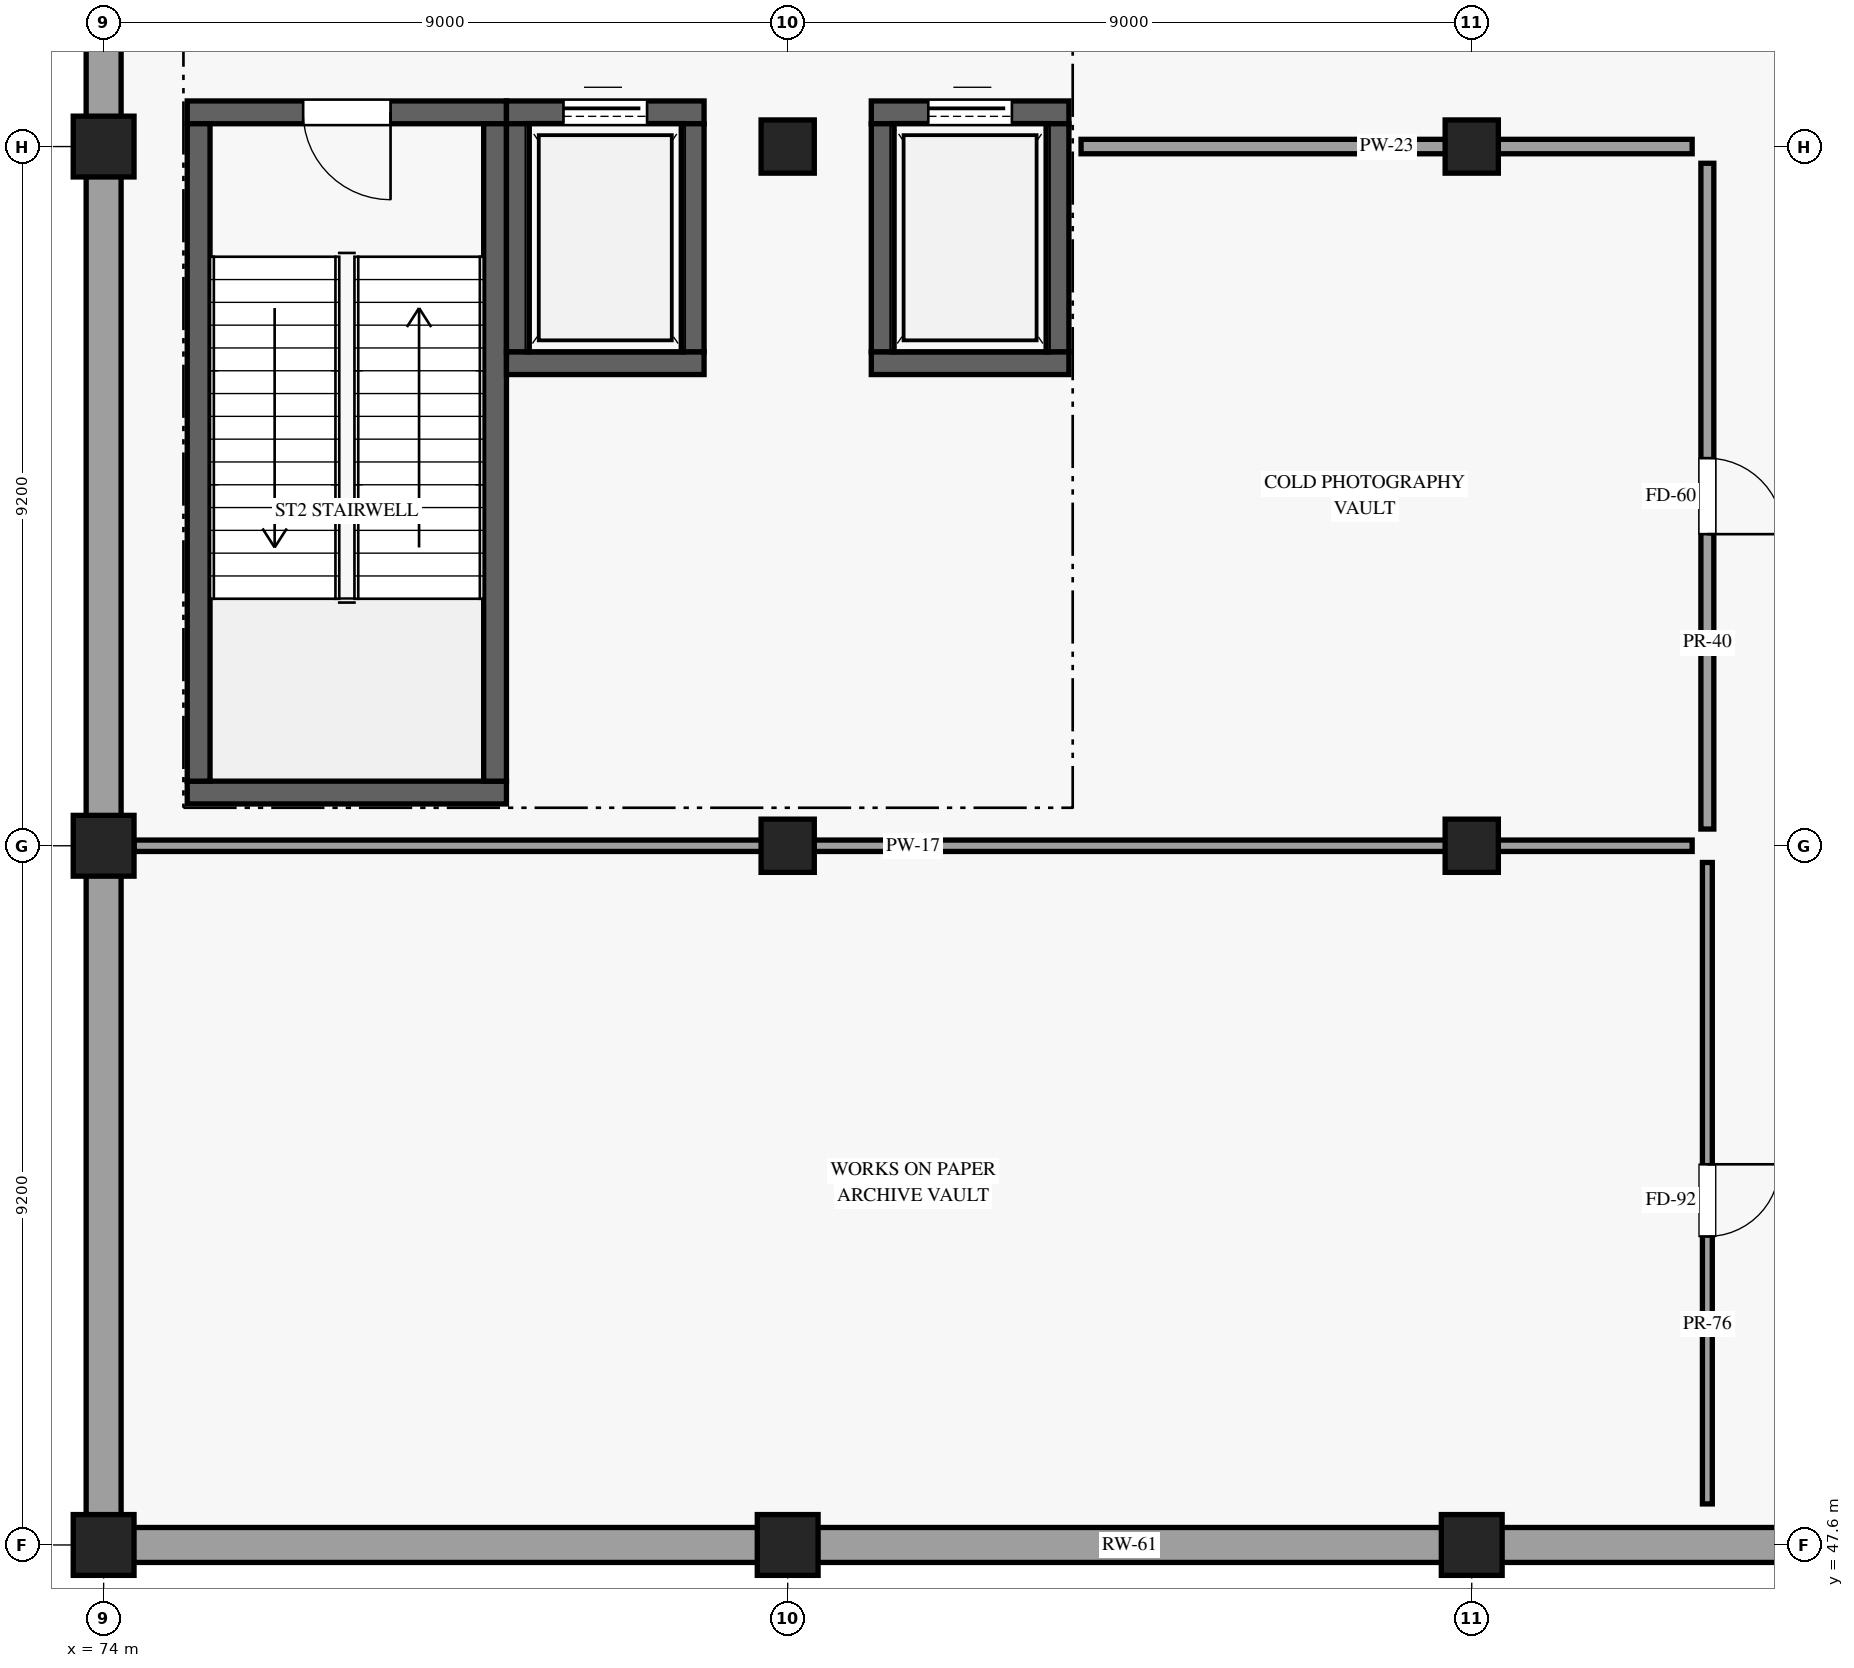
"""IFC4 building model, lengths in metres.
Left out: names, types, materials, properties, quantities, classifications, styles, units other than length and angle.
Written with IfcOpenShell. Run it as: python <this file> out.ifc"""

import sys

from ifc_helpers import new_model, si_unit, direction, frame, frame_2d, origin, origin_2d, place, context, subcontext, project, spatial, rectangle, extrude, element, fill, save


model = new_model("IFC4")
c1 = context("Model", 3, precision=1e-05, world=origin(), true_north=direction((0.0, 1.0)))
c2 = subcontext(c1, "Body", "Model", "MODEL_VIEW")
j1 = project(units=[si_unit("LENGTHUNIT", "METRE"), si_unit("PLANEANGLEUNIT", "RADIAN")], contexts=[c1])
p1 = place(None, origin())
s1 = spatial("IfcSite", under=j1, at=p1, CompositionType="ELEMENT")
p2 = place(p1, origin())
s2 = spatial("IfcBuilding", under=s1, at=p2, CompositionType="ELEMENT")
p3 = place(p2, frame((0.0, 0.0, -4.8)))
s3 = spatial("IfcBuildingStorey", under=s2, at=p3, CompositionType="ELEMENT", Elevation=-4.8)
for number, where, z_axis, x_axis in (
    (1, (74.0, 47.6, 0.0), (0.0, 0.0, 1.0), (1.0, 0.0, 0.0)),
    (2, (74.0, 56.8, 0.0), (0.0, 0.0, 1.0), (1.0, 0.0, 0.0)),
    (3, (74.0, 66.0, 0.0), (0.0, 0.0, 1.0), (1.0, 0.0, 0.0)),
    (4, (83.0, 47.6, 0.0), (0.0, 0.0, 1.0), (1.0, 0.0, 0.0)),
):
    element("IfcColumn", number, at=place(p3, frame(where, z_axis=z_axis, x_axis=x_axis)), inside=s3, PredefinedType="COLUMN", context=c2, shape_type="SweptSolid", body=[
        extrude(rectangle(XDim=0.8, YDim=0.8, at=origin_2d()), origin(), (0.0, 0.0, 1.0), 4.8),
    ])
for number, where, z_axis, x_axis in (
    (5, (83.0, 56.8, 0.0), (0.0, 0.0, 1.0), (1.0, 0.0, 0.0)),
    (6, (83.0, 66.0, 0.0), (0.0, 0.0, 1.0), (1.0, 0.0, 0.0)),
):
    element("IfcColumn", number, at=place(p3, frame(where, z_axis=z_axis, x_axis=x_axis)), inside=s3, PredefinedType="COLUMN", context=c2, shape_type="SweptSolid", body=[
        extrude(rectangle(XDim=0.7, YDim=0.7, at=origin_2d()), origin(), (0.0, 0.0, 1.0), 4.8),
    ])
p4 = place(p3, frame((92.0, 47.6, 0.0), z_axis=(0.0, 0.0, 1.0), x_axis=(1.0, 0.0, 0.0)))
e7 = element("IfcColumn", 7, at=p4, inside=s3, PredefinedType="COLUMN", context=c2, shape_type="SweptSolid", body=[
    extrude(rectangle(XDim=0.8, YDim=0.8, at=origin_2d()), origin(), (0.0, 0.0, 1.0), 4.8),
])
for number, where, z_axis, x_axis in (
    (8, (92.0, 56.8, 0.0), (0.0, 0.0, 1.0), (1.0, 0.0, 0.0)),
    (9, (92.0, 66.0, 0.0), (0.0, 0.0, 1.0), (1.0, 0.0, 0.0)),
):
    element("IfcColumn", number, at=place(p3, frame(where, z_axis=z_axis, x_axis=x_axis)), inside=s3, PredefinedType="COLUMN", context=c2, shape_type="SweptSolid", body=[
        extrude(rectangle(XDim=0.7, YDim=0.7, at=origin_2d()), origin(), (0.0, 0.0, 1.0), 4.8),
    ])
p5 = place(p3, frame((73.77, 47.6, 0.0), z_axis=(0.0, 0.0, 1.0), x_axis=(1.0, 0.0, 0.0)))
e10 = element("IfcWall", 10, at=p5, inside=s3, PredefinedType="SOLIDWALL", context=c2, shape_type="SweptSolid", body=[
    extrude(rectangle(XDim=27.46, YDim=0.46, at=frame_2d((13.73, 0.0))), origin(), (0.0, 0.0, 1.0), 3.515),
])
p6 = place(p3, frame((74.0, 47.6, 0.0), z_axis=(0.0, 0.0, 1.0), x_axis=(0.0, 1.0, 0.0)))
e11 = element("IfcWall", 11, at=p6, inside=s3, PredefinedType="SOLIDWALL", context=c2, shape_type="SweptSolid", body=[
    extrude(rectangle(XDim=27.6, YDim=0.46, at=frame_2d((13.8, 0.0))), origin(), (0.0, 0.0, 1.0), 3.215),
])
p7 = place(p3, frame((75.1, 66.45, 0.0), z_axis=(0.0, 0.0, 1.0), x_axis=(1.0, 0.0, 0.0)))
e12 = element("IfcWall", 12, at=p7, inside=s3, PredefinedType="SHEAR", context=c2, shape_type="SweptSolid", body=[
    extrude(rectangle(XDim=4.2, YDim=0.3, at=frame_2d((2.1, 0.0))), origin(), (0.0, 0.0, 1.0), 4.48),
])
p8 = place(p7, frame((2.675, 0.0, 0.0), z_axis=(0.0, 0.0, 1.0), x_axis=(-1.0, 0.0, 0.0)))
e13 = element("IfcOpeningElement", 13, at=p8, cuts=e12, PredefinedType="OPENING", context=c2, shape_type="SweptSolid", body=[
    extrude(rectangle(XDim=1.15, YDim=2.2, at=frame_2d((0.575, 1.1))), frame((0.0, 0.16, 0.0), z_axis=(0.0, -1.0, 0.0), x_axis=(1.0, 0.0, 0.0)), (0.0, 0.0, 1.0), 0.32),
])
p9 = place(p3, frame((75.1, 57.5, 0.0), z_axis=(0.0, 0.0, 1.0), x_axis=(1.0, 0.0, 0.0)))
e14 = element("IfcWall", 14, at=p9, inside=s3, PredefinedType="SHEAR", context=c2, shape_type="SweptSolid", body=[
    extrude(rectangle(XDim=4.2, YDim=0.3, at=frame_2d((2.1, 0.0))), origin(), (0.0, 0.0, 1.0), 4.48),
])
for number, where, z_axis, x_axis in (
    (15, (75.25, 57.65, 0.0), (0.0, 0.0, 1.0), (0.0, 1.0, 0.0)),
    (16, (79.15, 57.65, 0.0), (0.0, 0.0, 1.0), (0.0, 1.0, 0.0)),
):
    element("IfcWall", number, at=place(p3, frame(where, z_axis=z_axis, x_axis=x_axis)), inside=s3, PredefinedType="SHEAR", context=c2, shape_type="SweptSolid", body=[
        extrude(rectangle(XDim=8.65, YDim=0.3, at=frame_2d((4.325, 0.0))), origin(), (0.0, 0.0, 1.0), 4.48),
    ])
p10 = place(p3, frame((79.3, 66.45, 0.0), z_axis=(0.0, 0.0, 1.0), x_axis=(1.0, 0.0, 0.0)))
e17 = element("IfcWall", 17, at=p10, inside=s3, PredefinedType="SHEAR", context=c2, shape_type="SweptSolid", body=[
    extrude(rectangle(XDim=2.6, YDim=0.3, at=frame_2d((1.3, 0.0))), origin(), (0.0, 0.0, 1.0), 4.48),
])
p11 = place(p10, frame((0.75, 0.0, 0.0)))
e18 = element("IfcOpeningElement", 18, at=p11, cuts=e17, PredefinedType="OPENING", context=c2, shape_type="SweptSolid", body=[
    extrude(rectangle(XDim=1.1, YDim=2.2, at=frame_2d((0.55, 1.1))), frame((0.0, 0.16, 0.0), z_axis=(0.0, -1.0, 0.0), x_axis=(1.0, 0.0, 0.0)), (0.0, 0.0, 1.0), 0.32),
])
p12 = place(p3, frame((79.3, 63.15, 0.0), z_axis=(0.0, 0.0, 1.0), x_axis=(1.0, 0.0, 0.0)))
e19 = element("IfcWall", 19, at=p12, inside=s3, PredefinedType="SHEAR", context=c2, shape_type="SweptSolid", body=[
    extrude(rectangle(XDim=2.6, YDim=0.3, at=frame_2d((1.3, 0.0))), origin(), (0.0, 0.0, 1.0), 4.48),
])
for number, where, z_axis, x_axis in (
    (20, (81.75, 63.3, 0.0), (0.0, 0.0, 1.0), (0.0, 1.0, 0.0)),
    (21, (79.45, 63.3, 0.0), (0.0, 0.0, 1.0), (0.0, 1.0, 0.0)),
):
    element("IfcWall", number, at=place(p3, frame(where, z_axis=z_axis, x_axis=x_axis)), inside=s3, PredefinedType="SHEAR", context=c2, shape_type="SweptSolid", body=[
        extrude(rectangle(XDim=3.0, YDim=0.3, at=frame_2d((1.5, 0.0))), origin(), (0.0, 0.0, 1.0), 4.48),
    ])
p13 = place(p3, frame((84.1, 66.45, 0.0), z_axis=(0.0, 0.0, 1.0), x_axis=(1.0, 0.0, 0.0)))
e22 = element("IfcWall", 22, at=p13, inside=s3, PredefinedType="SHEAR", context=c2, shape_type="SweptSolid", body=[
    extrude(rectangle(XDim=2.6, YDim=0.3, at=frame_2d((1.3, 0.0))), origin(), (0.0, 0.0, 1.0), 4.48),
])
p14 = place(p13, frame((0.75, 0.0, 0.0)))
e23 = element("IfcOpeningElement", 23, at=p14, cuts=e22, PredefinedType="OPENING", context=c2, shape_type="SweptSolid", body=[
    extrude(rectangle(XDim=1.1, YDim=2.2, at=frame_2d((0.55, 1.1))), frame((0.0, 0.16, 0.0), z_axis=(0.0, -1.0, 0.0), x_axis=(1.0, 0.0, 0.0)), (0.0, 0.0, 1.0), 0.32),
])
p15 = place(p3, frame((84.1, 63.15, 0.0), z_axis=(0.0, 0.0, 1.0), x_axis=(1.0, 0.0, 0.0)))
e24 = element("IfcWall", 24, at=p15, inside=s3, PredefinedType="SHEAR", context=c2, shape_type="SweptSolid", body=[
    extrude(rectangle(XDim=2.6, YDim=0.3, at=frame_2d((1.3, 0.0))), origin(), (0.0, 0.0, 1.0), 4.48),
])
for number, where, z_axis, x_axis in (
    (25, (86.55, 63.3, 0.0), (0.0, 0.0, 1.0), (0.0, 1.0, 0.0)),
    (26, (84.25, 63.3, 0.0), (0.0, 0.0, 1.0), (0.0, 1.0, 0.0)),
):
    element("IfcWall", number, at=place(p3, frame(where, z_axis=z_axis, x_axis=x_axis)), inside=s3, PredefinedType="SHEAR", context=c2, shape_type="SweptSolid", body=[
        extrude(rectangle(XDim=3.0, YDim=0.3, at=frame_2d((1.5, 0.0))), origin(), (0.0, 0.0, 1.0), 4.48),
    ])
p16 = place(p3, frame((95.1, 48.14, 0.0), z_axis=(0.0, 0.0, 1.0), x_axis=(0.0, 1.0, 0.0)))
e27 = element("IfcWall", 27, at=p16, inside=s3, PredefinedType="PARTITIONING", context=c2, shape_type="SweptSolid", body=[
    extrude(rectangle(XDim=8.44, YDim=0.13, at=frame_2d((4.22, 0.0))), origin(), (0.0, 0.0, 1.0), 3.515),
])
p17 = place(p16, frame((4.469, 0.0, 0.0), z_axis=(0.0, 0.0, 1.0), x_axis=(-1.0, 0.0, 0.0)))
e28 = element("IfcOpeningElement", 28, at=p17, cuts=e27, PredefinedType="OPENING", context=c2, shape_type="SweptSolid", body=[
    extrude(rectangle(XDim=0.95, YDim=2.15, at=frame_2d((0.475, 1.075))), frame((0.0, 0.075, 0.0), z_axis=(0.0, -1.0, 0.0), x_axis=(1.0, 0.0, 0.0)), (0.0, 0.0, 1.0), 0.15),
])
p18 = place(p3, frame((74.4, 56.8, 0.0), z_axis=(0.0, 0.0, 1.0), x_axis=(1.0, 0.0, 0.0)))
e29 = element("IfcWall", 29, at=p18, inside=s3, PredefinedType="PARTITIONING", context=c2, shape_type="SweptSolid", body=[
    extrude(rectangle(XDim=20.5, YDim=0.15, at=frame_2d((10.25, 0.0))), origin(), (0.0, 0.0, 1.0), 3.515),
])
p19 = place(p3, frame((95.1, 57.02, 0.0), z_axis=(0.0, 0.0, 1.0), x_axis=(0.0, 1.0, 0.0)))
e30 = element("IfcWall", 30, at=p19, inside=s3, PredefinedType="PARTITIONING", context=c2, shape_type="SweptSolid", body=[
    extrude(rectangle(XDim=8.76, YDim=0.17, at=frame_2d((4.38, 0.0))), origin(), (0.0, 0.0, 1.0), 3.515),
])
p20 = place(p19, frame((4.88, 0.0, 0.0), z_axis=(0.0, 0.0, 1.0), x_axis=(-1.0, 0.0, 0.0)))
e31 = element("IfcOpeningElement", 31, at=p20, cuts=e30, PredefinedType="OPENING", context=c2, shape_type="SweptSolid", body=[
    extrude(rectangle(XDim=1.0, YDim=2.2, at=frame_2d((0.5, 1.1))), frame((0.0, 0.095, 0.0), z_axis=(0.0, -1.0, 0.0), x_axis=(1.0, 0.0, 0.0)), (0.0, 0.0, 1.0), 0.19),
])
p21 = place(p3, frame((86.86, 66.0, 0.0), z_axis=(0.0, 0.0, 1.0), x_axis=(1.0, 0.0, 0.0)))
e32 = element("IfcWall", 32, at=p21, inside=s3, PredefinedType="PARTITIONING", context=c2, shape_type="SweptSolid", body=[
    extrude(rectangle(XDim=8.04, YDim=0.19, at=frame_2d((4.02, 0.0))), origin(), (0.0, 0.0, 1.0), 3.515),
])
p22 = place(p8, origin())
e33 = element("IfcDoor", 33, at=p22, inside=s3, OperationType="SINGLE_SWING_LEFT", PredefinedType="DOOR", context=c2, shape_type="SweptSolid", body=[
    extrude(rectangle(XDim=1.15, YDim=2.2, at=frame_2d((0.575, 1.1))), frame((0.0, 0.025, 0.0), z_axis=(0.0, -1.0, 0.0), x_axis=(1.0, 0.0, 0.0)), (0.0, 0.0, 1.0), 0.05),
])
fill(e13, e33)
p23 = place(p11, origin())
e34 = element("IfcDoor", 34, at=p23, inside=s3, OperationType="SLIDING_TO_LEFT", PredefinedType="DOOR", context=c2, shape_type="SweptSolid", body=[
    extrude(rectangle(XDim=1.1, YDim=2.2, at=frame_2d((0.55, 1.1))), frame((0.0, 0.025, 0.0), z_axis=(0.0, -1.0, 0.0), x_axis=(1.0, 0.0, 0.0)), (0.0, 0.0, 1.0), 0.05),
])
fill(e18, e34)
p24 = place(p14, origin())
e35 = element("IfcDoor", 35, at=p24, inside=s3, OperationType="SLIDING_TO_RIGHT", PredefinedType="DOOR", context=c2, shape_type="SweptSolid", body=[
    extrude(rectangle(XDim=1.1, YDim=2.2, at=frame_2d((0.55, 1.1))), frame((0.0, 0.025, 0.0), z_axis=(0.0, -1.0, 0.0), x_axis=(1.0, 0.0, 0.0)), (0.0, 0.0, 1.0), 0.05),
])
fill(e23, e35)
p25 = place(p17, origin())
e36 = element("IfcDoor", 36, at=p25, inside=s3, OperationType="SINGLE_SWING_LEFT", PredefinedType="DOOR", context=c2, shape_type="SweptSolid", body=[
    extrude(rectangle(XDim=0.95, YDim=2.15, at=frame_2d((0.475, 1.075))), frame((0.0, 0.025, 0.0), z_axis=(0.0, -1.0, 0.0), x_axis=(1.0, 0.0, 0.0)), (0.0, 0.0, 1.0), 0.05),
])
fill(e28, e36)
p26 = place(p20, origin())
e37 = element("IfcDoor", 37, at=p26, inside=s3, OperationType="SINGLE_SWING_RIGHT", PredefinedType="DOOR", context=c2, shape_type="SweptSolid", body=[
    extrude(rectangle(XDim=1.0, YDim=2.2, at=frame_2d((0.5, 1.1))), frame((0.0, 0.025, 0.0), z_axis=(0.0, -1.0, 0.0), x_axis=(1.0, 0.0, 0.0)), (0.0, 0.0, 1.0), 0.05),
])
fill(e31, e37)
save(model, sys.argv[1])
